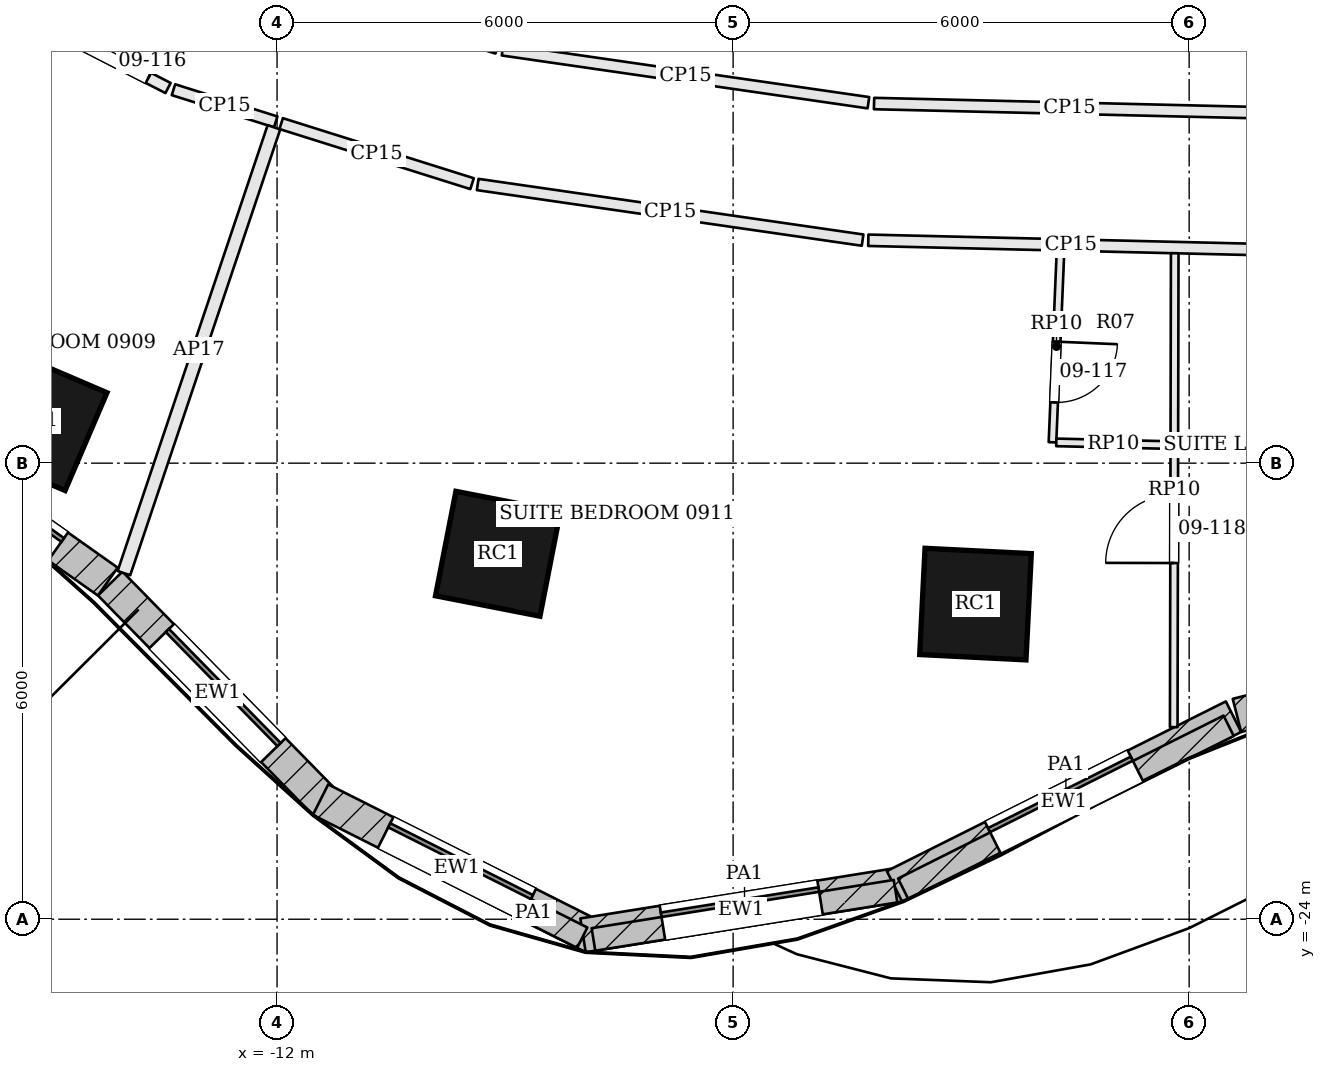
"""IFC4 building model, lengths in metres.
Left out: names, types, materials, properties, quantities, classifications, styles, units other than length and angle.
Written with IfcOpenShell. Run it as: python <this file> out.ifc"""

import sys

from ifc_helpers import new_model, si_unit, direction, frame, frame_2d, origin, origin_2d, place, context, subcontext, project, spatial, rectangle, extrude, element, fill, save


model = new_model("IFC4")
c1 = context("Model", 3, precision=1e-05, world=origin(), true_north=direction((0.0, 1.0)))
c2 = subcontext(c1, "Body", "Model", "MODEL_VIEW")
j1 = project(units=[si_unit("LENGTHUNIT", "METRE"), si_unit("PLANEANGLEUNIT", "RADIAN")], contexts=[c1])
p1 = place(None, origin())
s1 = spatial("IfcSite", under=j1, at=p1, CompositionType="ELEMENT")
p2 = place(p1, origin())
s2 = spatial("IfcBuilding", under=s1, at=p2, CompositionType="ELEMENT")
p3 = place(p2, frame((0.0, 0.0, 48.3)))
s3 = spatial("IfcBuildingStorey", under=s2, at=p3, CompositionType="ELEMENT", Elevation=48.3)
for number, where, z_axis, x_axis in (
    (1, (-15.157, -17.441, 0.0), (0.0, 0.0, 1.0), (0.919, -0.394, 0.0)),
    (2, (-9.094, -19.192, 0.0), (0.0, 0.0, 1.0), (0.981, -0.192, 0.0)),
    (3, (-2.811, -19.854, 0.0), (0.0, 0.0, 1.0), (0.999, -0.05, 0.0)),
):
    element("IfcColumn", number, at=place(p3, frame(where, z_axis=z_axis, x_axis=x_axis)), inside=s3, PredefinedType="COLUMN", context=c2, shape_type="SweptSolid", body=[
        extrude(rectangle(XDim=1.4, YDim=1.4, at=origin_2d()), origin(), (0.0, 0.0, 1.0), 3.6),
    ])
p4 = place(p3, frame((-17.249, -17.422, 0.0), z_axis=(0.0, 0.0, 1.0), x_axis=(0.816589291225, -0.577219134694, 0.0)))
e4 = element("IfcWall", 4, at=p4, inside=s3, PredefinedType="SOLIDWALL", context=c2, shape_type="SweptSolid", body=[
    extrude(rectangle(XDim=3.701, YDim=0.45, at=frame_2d((1.851, 0.0))), origin(), (0.0, 0.0, 1.0), 3.4),
])
p5 = place(p4, frame((0.801, 0.0, 0.9)))
e5 = element("IfcOpeningElement", 5, at=p5, cuts=e4, PredefinedType="OPENING", context=c2, shape_type="SweptSolid", body=[
    extrude(rectangle(XDim=2.1, YDim=2.0, at=frame_2d((1.05, 1.0))), frame((0.0, 0.235, 0.0), z_axis=(0.0, -1.0, 0.0), x_axis=(1.0, 0.0, 0.0)), (0.0, 0.0, 1.0), 0.47),
])
p6 = place(p3, frame((-14.195, -19.584, 0.0), z_axis=(0.0, 0.0, 1.0), x_axis=(0.69962350521, -0.714511687068, 0.0)))
e6 = element("IfcWall", 6, at=p6, inside=s3, PredefinedType="SOLIDWALL", context=c2, shape_type="SweptSolid", body=[
    extrude(rectangle(XDim=4.034, YDim=0.45, at=frame_2d((2.017, 0.0))), origin(), (0.0, 0.0, 1.0), 3.4),
])
p7 = place(p6, frame((0.967, 0.0, 0.9)))
e7 = element("IfcOpeningElement", 7, at=p7, cuts=e6, PredefinedType="OPENING", context=c2, shape_type="SweptSolid", body=[
    extrude(rectangle(XDim=2.1, YDim=2.0, at=frame_2d((1.05, 1.0))), frame((0.0, 0.235, 0.0), z_axis=(0.0, -1.0, 0.0), x_axis=(1.0, 0.0, 0.0)), (0.0, 0.0, 1.0), 0.47),
])
p8 = place(p3, frame((-11.428, -22.427, 0.0), z_axis=(0.0, 0.0, 1.0), x_axis=(0.893343208735, -0.449375023122, 0.0)))
e8 = element("IfcWall", 8, at=p8, inside=s3, PredefinedType="SOLIDWALL", context=c2, shape_type="SweptSolid", body=[
    extrude(rectangle(XDim=4.019, YDim=0.45, at=frame_2d((2.009, 0.0))), origin(), (0.0, 0.0, 1.0), 3.4),
])
p9 = place(p8, frame((0.959, 0.0, 0.9)))
e9 = element("IfcOpeningElement", 9, at=p9, cuts=e8, PredefinedType="OPENING", context=c2, shape_type="SweptSolid", body=[
    extrude(rectangle(XDim=2.1, YDim=2.0, at=frame_2d((1.05, 1.0))), frame((0.0, 0.235, 0.0), z_axis=(0.0, -1.0, 0.0), x_axis=(1.0, 0.0, 0.0)), (0.0, 0.0, 1.0), 0.47),
])
p10 = place(p3, frame((-7.975, -24.212, 0.0), z_axis=(0.0, 0.0, 1.0), x_axis=(0.987470607744, 0.157803038125, 0.0)))
e10 = element("IfcWall", 10, at=p10, inside=s3, PredefinedType="SOLIDWALL", context=c2, shape_type="SweptSolid", body=[
    extrude(rectangle(XDim=4.216, YDim=0.45, at=frame_2d((2.108, 0.0))), origin(), (0.0, 0.0, 1.0), 3.4),
])
p11 = place(p10, frame((1.058, 0.0, 0.9)))
e11 = element("IfcOpeningElement", 11, at=p11, cuts=e10, PredefinedType="OPENING", context=c2, shape_type="SweptSolid", body=[
    extrude(rectangle(XDim=2.1, YDim=2.0, at=frame_2d((1.05, 1.0))), frame((0.0, 0.235, 0.0), z_axis=(0.0, -1.0, 0.0), x_axis=(1.0, 0.0, 0.0)), (0.0, 0.0, 1.0), 0.47),
])
p12 = place(p3, frame((-3.877, -23.568, 0.0), z_axis=(0.0, 0.0, 1.0), x_axis=(0.894241088759, 0.447585606532, 0.0)))
e12 = element("IfcWall", 12, at=p12, inside=s3, PredefinedType="SOLIDWALL", context=c2, shape_type="SweptSolid", body=[
    extrude(rectangle(XDim=4.987, YDim=0.45, at=frame_2d((2.494, 0.0))), origin(), (0.0, 0.0, 1.0), 3.4),
])
p13 = place(p12, frame((1.444, 0.0, 0.9)))
e13 = element("IfcOpeningElement", 13, at=p13, cuts=e12, PredefinedType="OPENING", context=c2, shape_type="SweptSolid", body=[
    extrude(rectangle(XDim=2.1, YDim=2.0, at=frame_2d((1.05, 1.0))), frame((0.0, 0.235, 0.0), z_axis=(0.0, -1.0, 0.0), x_axis=(1.0, 0.0, 0.0)), (0.0, 0.0, 1.0), 0.47),
])
p14 = place(p3, frame((0.628, -21.319, 0.0), z_axis=(0.0, 0.0, 1.0), x_axis=(0.969240543873, 0.246115355295, 0.0)))
e14 = element("IfcWall", 14, at=p14, inside=s3, PredefinedType="SOLIDWALL", context=c2, shape_type="SweptSolid", body=[
    extrude(rectangle(XDim=2.743, YDim=0.45, at=frame_2d((1.372, 0.0))), origin(), (0.0, 0.0, 1.0), 3.4),
])
p15 = place(p14, frame((0.321, 0.0, 0.9)))
e15 = element("IfcOpeningElement", 15, at=p15, cuts=e14, PredefinedType="OPENING", context=c2, shape_type="SweptSolid", body=[
    extrude(rectangle(XDim=2.1, YDim=2.0, at=frame_2d((1.05, 1.0))), frame((0.0, 0.235, 0.0), z_axis=(0.0, -1.0, 0.0), x_axis=(1.0, 0.0, 0.0)), (0.0, 0.0, 1.0), 0.47),
])
p16 = place(p3, frame((-9.267, -23.598, 3.6), z_axis=(0.0, 0.0, 1.0), x_axis=(0.893335936782, -0.449389479242, 0.0)))
e16 = element("IfcWall", 16, at=p16, inside=s3, PredefinedType="PARAPET", context=c2, shape_type="SweptSolid", body=[
    extrude(rectangle(XDim=1.435, YDim=0.3, at=frame_2d((0.718, 0.0))), origin(), (0.0, 0.0, 1.0), 1.1),
])
p17 = place(p3, frame((-7.837, -24.266, 3.6), z_axis=(0.0, 0.0, 1.0), x_axis=(0.987476564543, 0.157765758254, 0.0)))
e17 = element("IfcWall", 17, at=p17, inside=s3, PredefinedType="PARAPET", context=c2, shape_type="SweptSolid", body=[
    extrude(rectangle(XDim=4.025, YDim=0.3, at=frame_2d((2.012, 0.0))), origin(), (0.0, 0.0, 1.0), 1.1),
])
p18 = place(p3, frame((-3.763, -23.599, 3.6), z_axis=(0.0, 0.0, 1.0), x_axis=(0.894243576514, 0.447580636158, 0.0)))
e18 = element("IfcWall", 18, at=p18, inside=s3, PredefinedType="PARAPET", context=c2, shape_type="SweptSolid", body=[
    extrude(rectangle(XDim=4.789, YDim=0.3, at=frame_2d((2.394, 0.0))), origin(), (0.0, 0.0, 1.0), 1.1),
])
p19 = place(p3, frame((-16.095, -11.698, 0.0), z_axis=(0.0, 0.0, 1.0), x_axis=(0.88955984693, -0.456818649717, 0.0)))
e19 = element("IfcWall", 19, at=p19, inside=s3, PredefinedType="PARTITIONING", context=c2, shape_type="SweptSolid", body=[
    extrude(rectangle(XDim=2.991, YDim=0.15, at=frame_2d((1.496, 0.0))), origin(), (0.0, 0.0, 1.0), 2.68),
])
p20 = place(p19, frame((1.7, 0.0, 0.0)))
e20 = element("IfcOpeningElement", 20, at=p20, cuts=e19, PredefinedType="OPENING", context=c2, shape_type="SweptSolid", body=[
    extrude(rectangle(XDim=1.0, YDim=2.1, at=frame_2d((0.5, 1.05))), frame((0.0, 0.085, 0.0), z_axis=(0.0, -1.0, 0.0), x_axis=(1.0, 0.0, 0.0)), (0.0, 0.0, 1.0), 0.17),
])
p21 = place(p3, frame((-13.363, -13.087, 0.0), z_axis=(0.0, 0.0, 1.0), x_axis=(0.95389606241, -0.300137138853, 0.0)))
e21 = element("IfcWall", 21, at=p21, inside=s3, PredefinedType="PARTITIONING", context=c2, shape_type="SweptSolid", body=[
    extrude(rectangle(XDim=1.41, YDim=0.15, at=frame_2d((0.705, 0.0))), origin(), (0.0, 0.0, 1.0), 2.68),
])
p22 = place(p3, frame((-14.014, -19.447, 0.0), z_axis=(0.0, 0.0, 1.0), x_axis=(0.31884215866, 0.947807827495, 0.0)))
e22 = element("IfcWall", 22, at=p22, inside=s3, PredefinedType="PARTITIONING", context=c2, shape_type="SweptSolid", body=[
    extrude(rectangle(XDim=6.188, YDim=0.175, at=frame_2d((3.094, 0.0))), origin(), (0.0, 0.0, 1.0), 2.68),
])
p23 = place(p3, frame((-11.946, -13.533, 0.0), z_axis=(0.0, 0.0, 1.0), x_axis=(0.95388072649, -0.300185875136, 0.0)))
e23 = element("IfcWall", 23, at=p23, inside=s3, PredefinedType="PARTITIONING", context=c2, shape_type="SweptSolid", body=[
    extrude(rectangle(XDim=2.633, YDim=0.15, at=frame_2d((1.316, 0.0))), origin(), (0.0, 0.0, 1.0), 2.68),
])
p24 = place(p3, frame((-9.36, -14.333, 0.0), z_axis=(0.0, 0.0, 1.0), x_axis=(0.989708543436, -0.143097865286, 0.0)))
e24 = element("IfcWall", 24, at=p24, inside=s3, PredefinedType="PARTITIONING", context=c2, shape_type="SweptSolid", body=[
    extrude(rectangle(XDim=5.117, YDim=0.15, at=frame_2d((2.558, 0.0))), origin(), (0.0, 0.0, 1.0), 2.68),
])
p25 = place(p3, frame((-4.221, -15.067, 0.0), z_axis=(0.0, 0.0, 1.0), x_axis=(0.999716725606, -0.023800599639, 0.0)))
e25 = element("IfcWall", 25, at=p25, inside=s3, PredefinedType="PARTITIONING", context=c2, shape_type="SweptSolid", body=[
    extrude(rectangle(XDim=5.334, YDim=0.15, at=frame_2d((2.667, 0.0))), origin(), (0.0, 0.0, 1.0), 2.68),
])
p26 = place(p3, frame((1.0, -13.391, 0.0), z_axis=(0.0, 0.0, 1.0), x_axis=(-0.999717667096, 0.023761020505, 0.0)))
e26 = element("IfcWall", 26, at=p26, inside=s3, PredefinedType="PARTITIONING", context=c2, shape_type="SweptSolid", body=[
    extrude(rectangle(XDim=5.148, YDim=0.15, at=frame_2d((2.574, 0.0))), origin(), (0.0, 0.0, 1.0), 2.68),
])
p27 = place(p3, frame((-4.22, -13.258, 0.0), z_axis=(0.0, 0.0, 1.0), x_axis=(-0.98971114365, 0.143079880258, 0.0)))
e27 = element("IfcWall", 27, at=p27, inside=s3, PredefinedType="PARTITIONING", context=c2, shape_type="SweptSolid", body=[
    extrude(rectangle(XDim=4.863, YDim=0.15, at=frame_2d((2.432, 0.0))), origin(), (0.0, 0.0, 1.0), 2.68),
])
p28 = place(p3, frame((-9.104, -12.54, 0.0), z_axis=(0.0, 0.0, 1.0), x_axis=(-0.953891280763, 0.300152335464, 0.0)))
e28 = element("IfcWall", 28, at=p28, inside=s3, PredefinedType="PARTITIONING", context=c2, shape_type="SweptSolid", body=[
    extrude(rectangle(XDim=3.82, YDim=0.15, at=frame_2d((1.91, 0.0))), origin(), (0.0, 0.0, 1.0), 2.68),
])
p29 = place(p3, frame((-0.203, -21.473, 0.0), z_axis=(0.0, 0.0, 1.0), x_axis=(0.00203625689, 0.999997926827, 0.0)))
e29 = element("IfcWall", 29, at=p29, inside=s3, PredefinedType="PARTITIONING", context=c2, shape_type="SweptSolid", body=[
    extrude(rectangle(XDim=6.235, YDim=0.1, at=frame_2d((3.117, 0.0))), origin(), (0.0, 0.0, 1.0), 2.934),
])
p30 = place(p29, frame((2.159, 0.0, 0.0)))
e30 = element("IfcOpeningElement", 30, at=p30, cuts=e29, PredefinedType="OPENING", context=c2, shape_type="SweptSolid", body=[
    extrude(rectangle(XDim=0.9, YDim=2.4, at=frame_2d((0.45, 1.2))), frame((0.0, 0.06, 0.0), z_axis=(0.0, -1.0, 0.0), x_axis=(1.0, 0.0, 0.0)), (0.0, 0.0, 1.0), 0.12),
])
p31 = place(p3, frame((-1.693, -15.203, 0.0), z_axis=(0.0, 0.0, 1.0), x_axis=(-0.041867833866, -0.999123157818, 0.0)))
e31 = element("IfcWall", 31, at=p31, inside=s3, PredefinedType="PARTITIONING", context=c2, shape_type="SweptSolid", body=[
    extrude(rectangle(XDim=2.525, YDim=0.1, at=frame_2d((1.262, 0.0))), origin(), (0.0, 0.0, 1.0), 2.934),
])
p32 = place(p31, frame((1.2, 0.0, 0.0)))
e32 = element("IfcOpeningElement", 32, at=p32, cuts=e31, PredefinedType="OPENING", context=c2, shape_type="SweptSolid", body=[
    extrude(rectangle(XDim=0.8, YDim=2.1, at=frame_2d((0.4, 1.05))), frame((0.0, 0.06, 0.0), z_axis=(0.0, -1.0, 0.0), x_axis=(1.0, 0.0, 0.0)), (0.0, 0.0, 1.0), 0.12),
])
p33 = place(p3, frame((-1.748, -17.727, 0.0), z_axis=(0.0, 0.0, 1.0), x_axis=(0.99971887768, -0.023710031862, 0.0)))
e33 = element("IfcWall", 33, at=p33, inside=s3, PredefinedType="PARTITIONING", context=c2, shape_type="SweptSolid", body=[
    extrude(rectangle(XDim=1.503, YDim=0.1, at=frame_2d((0.752, 0.0))), origin(), (0.0, 0.0, 1.0), 2.934),
])
p34 = place(p5, origin())
e34 = element("IfcWindow", 34, at=p34, inside=s3, PartitioningType="SINGLE_PANEL", PredefinedType="WINDOW", context=c2, shape_type="SweptSolid", body=[
    extrude(rectangle(XDim=2.1, YDim=2.0, at=frame_2d((1.05, 1.0))), frame((0.0, 0.135, 0.0), z_axis=(0.0, -1.0, 0.0), x_axis=(1.0, 0.0, 0.0)), (0.0, 0.0, 1.0), 0.06),
])
fill(e5, e34)
p35 = place(p7, origin())
e35 = element("IfcWindow", 35, at=p35, inside=s3, PartitioningType="SINGLE_PANEL", PredefinedType="WINDOW", context=c2, shape_type="SweptSolid", body=[
    extrude(rectangle(XDim=2.1, YDim=2.0, at=frame_2d((1.05, 1.0))), frame((0.0, 0.135, 0.0), z_axis=(0.0, -1.0, 0.0), x_axis=(1.0, 0.0, 0.0)), (0.0, 0.0, 1.0), 0.06),
])
fill(e7, e35)
p36 = place(p9, origin())
e36 = element("IfcWindow", 36, at=p36, inside=s3, PartitioningType="SINGLE_PANEL", PredefinedType="WINDOW", context=c2, shape_type="SweptSolid", body=[
    extrude(rectangle(XDim=2.1, YDim=2.0, at=frame_2d((1.05, 1.0))), frame((0.0, 0.135, 0.0), z_axis=(0.0, -1.0, 0.0), x_axis=(1.0, 0.0, 0.0)), (0.0, 0.0, 1.0), 0.06),
])
fill(e9, e36)
p37 = place(p11, origin())
e37 = element("IfcWindow", 37, at=p37, inside=s3, PartitioningType="SINGLE_PANEL", PredefinedType="WINDOW", context=c2, shape_type="SweptSolid", body=[
    extrude(rectangle(XDim=2.1, YDim=2.0, at=frame_2d((1.05, 1.0))), frame((0.0, 0.135, 0.0), z_axis=(0.0, -1.0, 0.0), x_axis=(1.0, 0.0, 0.0)), (0.0, 0.0, 1.0), 0.06),
])
fill(e11, e37)
p38 = place(p13, origin())
e38 = element("IfcWindow", 38, at=p38, inside=s3, PartitioningType="SINGLE_PANEL", PredefinedType="WINDOW", context=c2, shape_type="SweptSolid", body=[
    extrude(rectangle(XDim=2.1, YDim=2.0, at=frame_2d((1.05, 1.0))), frame((0.0, 0.135, 0.0), z_axis=(0.0, -1.0, 0.0), x_axis=(1.0, 0.0, 0.0)), (0.0, 0.0, 1.0), 0.06),
])
fill(e13, e38)
p39 = place(p20, origin())
e39 = element("IfcDoor", 39, at=p39, inside=s3, OperationType="SINGLE_SWING_RIGHT", PredefinedType="DOOR", context=c2, shape_type="SweptSolid", body=[
    extrude(rectangle(XDim=1.0, YDim=2.1, at=frame_2d((0.5, 1.05))), frame((0.0, 0.025, 0.0), z_axis=(0.0, -1.0, 0.0), x_axis=(1.0, 0.0, 0.0)), (0.0, 0.0, 1.0), 0.05),
])
fill(e20, e39)
p40 = place(p32, origin())
e40 = element("IfcDoor", 40, at=p40, inside=s3, OperationType="SINGLE_SWING_LEFT", PredefinedType="DOOR", context=c2, shape_type="SweptSolid", body=[
    extrude(rectangle(XDim=0.8, YDim=2.1, at=frame_2d((0.4, 1.05))), frame((0.0, 0.025, 0.0), z_axis=(0.0, -1.0, 0.0), x_axis=(1.0, 0.0, 0.0)), (0.0, 0.0, 1.0), 0.05),
])
fill(e32, e40)
p41 = place(p30, origin())
e41 = element("IfcDoor", 41, at=p41, inside=s3, OperationType="SINGLE_SWING_LEFT", PredefinedType="DOOR", context=c2, shape_type="SweptSolid", body=[
    extrude(rectangle(XDim=0.9, YDim=2.4, at=frame_2d((0.45, 1.2))), frame((0.0, 0.025, 0.0), z_axis=(0.0, -1.0, 0.0), x_axis=(1.0, 0.0, 0.0)), (0.0, 0.0, 1.0), 0.05),
])
fill(e30, e41)
save(model, sys.argv[1])
